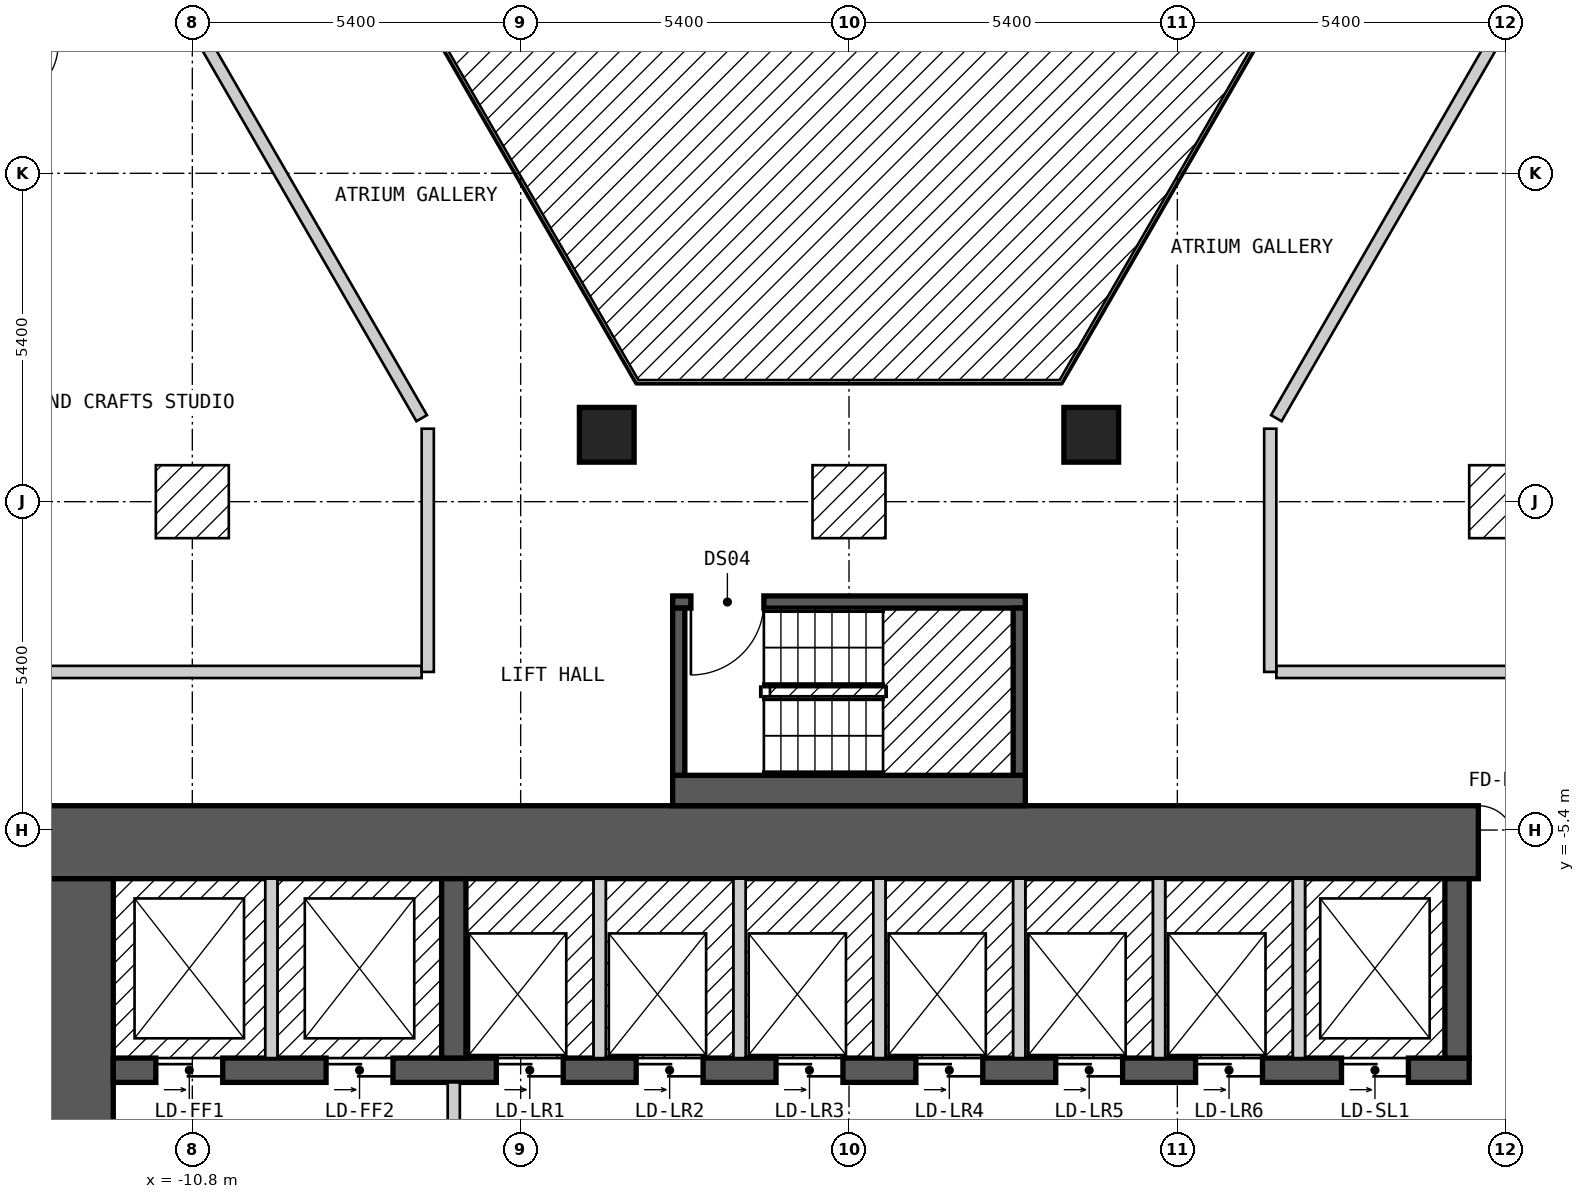
"""IFC4 building model, lengths in metres.
Left out: names, types, materials, properties, quantities, classifications, styles, units other than length and angle.
Written with IfcOpenShell. Run it as: python <this file> out.ifc"""

import sys

from ifc_helpers import new_model, si_unit, direction, frame, frame_2d, origin, origin_2d, place, context, subcontext, project, spatial, rectangle, extrude, element, fill, save


model = new_model("IFC4")
c1 = context("Model", 3, precision=1e-05, world=origin(), true_north=direction((0.0, 1.0)))
c2 = subcontext(c1, "Body", "Model", "MODEL_VIEW")
j1 = project(units=[si_unit("LENGTHUNIT", "METRE"), si_unit("PLANEANGLEUNIT", "RADIAN")], contexts=[c1])
p1 = place(None, origin())
s1 = spatial("IfcSite", under=j1, at=p1, CompositionType="ELEMENT")
p2 = place(p1, origin())
s2 = spatial("IfcBuilding", under=s1, at=p2, CompositionType="ELEMENT")
p3 = place(p2, frame((0.0, 0.0, 23.4)))
s3 = spatial("IfcBuildingStorey", under=s2, at=p3, CompositionType="ELEMENT", Elevation=23.4)
for number, where, z_axis, x_axis in (
    (1, (3.984, 1.1, 0.0), (0.0, 0.0, 1.0), (1.0, 0.0, 0.0)),
    (2, (-3.984, 1.1, 0.0), (0.0, 0.0, 1.0), (1.0, 0.0, 0.0)),
):
    element("IfcColumn", number, at=place(p3, frame(where, z_axis=z_axis, x_axis=x_axis)), inside=s3, PredefinedType="COLUMN", context=c2, shape_type="SweptSolid", body=[
        extrude(rectangle(XDim=0.9, YDim=0.9, at=origin_2d()), origin(), (0.0, 0.0, 1.0), 3.0),
    ])
p4 = place(p3, frame((-13.3, -5.6, 0.0), z_axis=(0.0, 0.0, 1.0), x_axis=(1.0, 0.0, 0.0)))
e3 = element("IfcWall", 3, at=p4, inside=s3, PredefinedType="SHEAR", context=c2, shape_type="SweptSolid", body=[
    extrude(rectangle(XDim=26.6, YDim=1.2, at=frame_2d((13.3, 0.0))), origin(), (0.0, 0.0, 1.0), 2.7),
])
p5 = place(p4, frame((23.65, 0.0, 0.0)))
e4 = element("IfcOpeningElement", 4, at=p5, cuts=e3, PredefinedType="OPENING", context=c2, shape_type="SweptSolid", body=[
    extrude(rectangle(XDim=1.2, YDim=2.1, at=frame_2d((0.6, 1.05))), frame((0.0, 0.61, 0.0), z_axis=(0.0, -1.0, 0.0), x_axis=(1.0, 0.0, 0.0)), (0.0, 0.0, 1.0), 1.22),
])
p6 = place(p3, frame((-12.7, -17.8, 0.0), z_axis=(0.0, 0.0, 1.0), x_axis=(0.0, 1.0, 0.0)))
e5 = element("IfcWall", 5, at=p6, inside=s3, PredefinedType="SHEAR", context=c2, shape_type="SweptSolid", body=[
    extrude(rectangle(XDim=11.6, YDim=1.2, at=frame_2d((5.8, 0.0))), origin(), (0.0, 0.0, 1.0), 2.7),
])
p7 = place(p6, frame((3.6, 0.0, 0.0)))
e6 = element("IfcOpeningElement", 6, at=p7, cuts=e5, PredefinedType="OPENING", context=c2, shape_type="SweptSolid", body=[
    extrude(rectangle(XDim=1.2, YDim=2.1, at=frame_2d((0.6, 1.05))), frame((0.0, 0.61, 0.0), z_axis=(0.0, -1.0, 0.0), x_axis=(1.0, 0.0, 0.0)), (0.0, 0.0, 1.0), 1.22),
])
p8 = place(p3, frame((-12.1, -9.35, 0.0), z_axis=(0.0, 0.0, 1.0), x_axis=(1.0, 0.0, 0.0)))
e7 = element("IfcWall", 7, at=p8, inside=s3, PredefinedType="SHEAR", context=c2, shape_type="SweptSolid", body=[
    extrude(rectangle(XDim=22.3, YDim=0.4, at=frame_2d((11.15, 0.0))), origin(), (0.0, 0.0, 1.0), 2.7),
])
p9 = place(p8, frame((0.7, 0.0, 0.0)))
e8 = element("IfcOpeningElement", 8, at=p9, cuts=e7, PredefinedType="OPENING", context=c2, shape_type="SweptSolid", body=[
    extrude(rectangle(XDim=1.1, YDim=2.1, at=frame_2d((0.55, 1.05))), frame((0.0, 0.21, 0.0), z_axis=(0.0, -1.0, 0.0), x_axis=(1.0, 0.0, 0.0)), (0.0, 0.0, 1.0), 0.42),
])
p10 = place(p8, frame((3.5, 0.0, 0.0)))
e9 = element("IfcOpeningElement", 9, at=p10, cuts=e7, PredefinedType="OPENING", context=c2, shape_type="SweptSolid", body=[
    extrude(rectangle(XDim=1.1, YDim=2.1, at=frame_2d((0.55, 1.05))), frame((0.0, 0.21, 0.0), z_axis=(0.0, -1.0, 0.0), x_axis=(1.0, 0.0, 0.0)), (0.0, 0.0, 1.0), 0.42),
])
p11 = place(p8, frame((6.3, 0.0, 0.0)))
e10 = element("IfcOpeningElement", 10, at=p11, cuts=e7, PredefinedType="OPENING", context=c2, shape_type="SweptSolid", body=[
    extrude(rectangle(XDim=1.1, YDim=2.1, at=frame_2d((0.55, 1.05))), frame((0.0, 0.21, 0.0), z_axis=(0.0, -1.0, 0.0), x_axis=(1.0, 0.0, 0.0)), (0.0, 0.0, 1.0), 0.42),
])
p12 = place(p8, frame((8.6, 0.0, 0.0)))
e11 = element("IfcOpeningElement", 11, at=p12, cuts=e7, PredefinedType="OPENING", context=c2, shape_type="SweptSolid", body=[
    extrude(rectangle(XDim=1.1, YDim=2.1, at=frame_2d((0.55, 1.05))), frame((0.0, 0.21, 0.0), z_axis=(0.0, -1.0, 0.0), x_axis=(1.0, 0.0, 0.0)), (0.0, 0.0, 1.0), 0.42),
])
p13 = place(p8, frame((10.9, 0.0, 0.0)))
e12 = element("IfcOpeningElement", 12, at=p13, cuts=e7, PredefinedType="OPENING", context=c2, shape_type="SweptSolid", body=[
    extrude(rectangle(XDim=1.1, YDim=2.1, at=frame_2d((0.55, 1.05))), frame((0.0, 0.21, 0.0), z_axis=(0.0, -1.0, 0.0), x_axis=(1.0, 0.0, 0.0)), (0.0, 0.0, 1.0), 0.42),
])
p14 = place(p8, frame((13.2, 0.0, 0.0)))
e13 = element("IfcOpeningElement", 13, at=p14, cuts=e7, PredefinedType="OPENING", context=c2, shape_type="SweptSolid", body=[
    extrude(rectangle(XDim=1.1, YDim=2.1, at=frame_2d((0.55, 1.05))), frame((0.0, 0.21, 0.0), z_axis=(0.0, -1.0, 0.0), x_axis=(1.0, 0.0, 0.0)), (0.0, 0.0, 1.0), 0.42),
])
p15 = place(p8, frame((15.5, 0.0, 0.0)))
e14 = element("IfcOpeningElement", 14, at=p15, cuts=e7, PredefinedType="OPENING", context=c2, shape_type="SweptSolid", body=[
    extrude(rectangle(XDim=1.1, YDim=2.1, at=frame_2d((0.55, 1.05))), frame((0.0, 0.21, 0.0), z_axis=(0.0, -1.0, 0.0), x_axis=(1.0, 0.0, 0.0)), (0.0, 0.0, 1.0), 0.42),
])
p16 = place(p8, frame((17.8, 0.0, 0.0)))
e15 = element("IfcOpeningElement", 15, at=p16, cuts=e7, PredefinedType="OPENING", context=c2, shape_type="SweptSolid", body=[
    extrude(rectangle(XDim=1.1, YDim=2.1, at=frame_2d((0.55, 1.05))), frame((0.0, 0.21, 0.0), z_axis=(0.0, -1.0, 0.0), x_axis=(1.0, 0.0, 0.0)), (0.0, 0.0, 1.0), 0.42),
])
p17 = place(p8, frame((20.2, 0.0, 0.0)))
e16 = element("IfcOpeningElement", 16, at=p17, cuts=e7, PredefinedType="OPENING", context=c2, shape_type="SweptSolid", body=[
    extrude(rectangle(XDim=1.1, YDim=2.1, at=frame_2d((0.55, 1.05))), frame((0.0, 0.21, 0.0), z_axis=(0.0, -1.0, 0.0), x_axis=(1.0, 0.0, 0.0)), (0.0, 0.0, 1.0), 0.42),
])
for number, where, z_axis, x_axis in (
    (17, (-6.5, -9.15, 0.0), (0.0, 0.0, 1.0), (0.0, 1.0, 0.0)),
    (18, (10.0, -9.15, 0.0), (0.0, 0.0, 1.0), (0.0, 1.0, 0.0)),
):
    element("IfcWall", number, at=place(p3, frame(where, z_axis=z_axis, x_axis=x_axis)), inside=s3, PredefinedType="SHEAR", context=c2, shape_type="SweptSolid", body=[
        extrude(rectangle(XDim=2.95, YDim=0.4, at=frame_2d((1.475, 0.0))), origin(), (0.0, 0.0, 1.0), 2.7),
    ])
p18 = place(p3, frame((-2.9, -4.75, 0.0), z_axis=(0.0, 0.0, 1.0), x_axis=(1.0, 0.0, 0.0)))
e19 = element("IfcWall", 19, at=p18, inside=s3, PredefinedType="SOLIDWALL", context=c2, shape_type="SweptSolid", body=[
    extrude(rectangle(XDim=5.8, YDim=0.5, at=frame_2d((2.9, 0.0))), origin(), (0.0, 0.0, 1.0), 2.7),
])
p19 = place(p3, frame((-2.9, -1.65, 0.0), z_axis=(0.0, 0.0, 1.0), x_axis=(1.0, 0.0, 0.0)))
e20 = element("IfcWall", 20, at=p19, inside=s3, PredefinedType="SOLIDWALL", context=c2, shape_type="SweptSolid", body=[
    extrude(rectangle(XDim=5.8, YDim=0.2, at=frame_2d((2.9, 0.0))), origin(), (0.0, 0.0, 1.0), 2.7),
])
p20 = place(p19, frame((0.3, 0.0, 0.0)))
e21 = element("IfcOpeningElement", 21, at=p20, cuts=e20, PredefinedType="OPENING", context=c2, shape_type="SweptSolid", body=[
    extrude(rectangle(XDim=1.2, YDim=2.1, at=frame_2d((0.6, 1.05))), frame((0.0, 0.11, 0.0), z_axis=(0.0, -1.0, 0.0), x_axis=(1.0, 0.0, 0.0)), (0.0, 0.0, 1.0), 0.22),
])
for number, where, z_axis, x_axis in (
    (22, (-2.8, -4.5, 0.0), (0.0, 0.0, 1.0), (0.0, 1.0, 0.0)),
    (23, (2.8, -4.5, 0.0), (0.0, 0.0, 1.0), (0.0, 1.0, 0.0)),
):
    element("IfcWall", number, at=place(p3, frame(where, z_axis=z_axis, x_axis=x_axis)), inside=s3, PredefinedType="SOLIDWALL", context=c2, shape_type="SweptSolid", body=[
        extrude(rectangle(XDim=2.75, YDim=0.2, at=frame_2d((1.375, 0.0))), origin(), (0.0, 0.0, 1.0), 2.7),
    ])
p21 = place(p3, frame((-10.796, 7.9, 0.0), z_axis=(0.0, 0.0, 1.0), x_axis=(0.499954271211, -0.866051803703, 0.0)))
e24 = element("IfcWall", 24, at=p21, inside=s3, PredefinedType="PARTITIONING", context=c2, shape_type="SweptSolid", body=[
    extrude(rectangle(XDim=7.536, YDim=0.2, at=frame_2d((3.768, 0.0))), origin(), (0.0, 0.0, 1.0), 2.7),
])
p22 = place(p3, frame((9.18, 15.7, 0.0), z_axis=(0.0, 0.0, 1.0), x_axis=(0.500003652032, -0.866023295272, 0.0)))
e25 = element("IfcWall", 25, at=p22, inside=s3, PredefinedType="PARTITIONING", context=c2, shape_type="SweptSolid", body=[
    extrude(rectangle(XDim=18.012, YDim=0.2, at=frame_2d((9.006, 0.0))), origin(), (0.0, 0.0, 1.0), 2.7),
])
p23 = place(p22, frame((8.556, 0.0, 0.0)))
e26 = element("IfcOpeningElement", 26, at=p23, cuts=e25, PredefinedType="OPENING", context=c2, shape_type="SweptSolid", body=[
    extrude(rectangle(XDim=0.9, YDim=2.1, at=frame_2d((0.45, 1.05))), frame((0.0, 0.11, 0.0), z_axis=(0.0, -1.0, 0.0), x_axis=(1.0, 0.0, 0.0)), (0.0, 0.0, 1.0), 0.22),
])
p24 = place(p3, frame((10.45, 17.9, 0.0), z_axis=(0.0, 0.0, 1.0), x_axis=(0.500034352617, -0.866005569383, 0.0)))
e27 = element("IfcWall", 27, at=p24, inside=s3, PredefinedType="PARTITIONING", context=c2, shape_type="SweptSolid", body=[
    extrude(rectangle(XDim=20.553, YDim=0.2, at=frame_2d((10.276, 0.0))), origin(), (0.0, 0.0, 1.0), 2.7),
])
p25 = place(p24, frame((14.903, 0.0, 0.0)))
e28 = element("IfcOpeningElement", 28, at=p25, cuts=e27, PredefinedType="OPENING", context=c2, shape_type="SweptSolid", body=[
    extrude(rectangle(XDim=1.0, YDim=2.1, at=frame_2d((0.5, 1.05))), frame((0.0, 0.11, 0.0), z_axis=(0.0, -1.0, 0.0), x_axis=(1.0, 0.0, 0.0)), (0.0, 0.0, 1.0), 0.22),
])
p26 = place(p24, frame((9.775, 0.0, 0.0)))
e29 = element("IfcOpeningElement", 29, at=p26, cuts=e27, PredefinedType="OPENING", context=c2, shape_type="SweptSolid", body=[
    extrude(rectangle(XDim=1.0, YDim=2.1, at=frame_2d((0.5, 1.05))), frame((0.0, 0.11, 0.0), z_axis=(0.0, -1.0, 0.0), x_axis=(1.0, 0.0, 0.0)), (0.0, 0.0, 1.0), 0.22),
])
for number, where, z_axis, x_axis in (
    (30, (-15.4, -2.8, 0.0), (0.0, 0.0, 1.0), (1.0, 0.0, 0.0)),
    (31, (7.028, -2.8, 0.0), (0.0, 0.0, 1.0), (1.0, 0.0, 0.0)),
):
    element("IfcWall", number, at=place(p3, frame(where, z_axis=z_axis, x_axis=x_axis)), inside=s3, PredefinedType="PARTITIONING", context=c2, shape_type="SweptSolid", body=[
        extrude(rectangle(XDim=8.372, YDim=0.2, at=frame_2d((4.186, 0.0))), origin(), (0.0, 0.0, 1.0), 2.7),
    ])
p27 = place(p3, frame((7.028, 1.373, 0.0), z_axis=(0.0, 0.0, 1.0), x_axis=(0.49998574534, 0.86603363356, 0.0)))
e32 = element("IfcWall", 32, at=p27, inside=s3, PredefinedType="PARTITIONING", context=c2, shape_type="SweptSolid", body=[
    extrude(rectangle(XDim=7.652, YDim=0.2, at=frame_2d((3.826, 0.0))), origin(), (0.0, 0.0, 1.0), 2.7),
])
p28 = place(p3, frame((-18.244, -0.001, 0.0), z_axis=(0.0, 0.0, 1.0), x_axis=(0.499962999376, 0.866046765051, 0.0)))
e33 = element("IfcWall", 33, at=p28, inside=s3, PredefinedType="PARTITIONING", context=c2, shape_type="SweptSolid", body=[
    extrude(rectangle(XDim=18.245, YDim=0.2, at=frame_2d((9.123, 0.0))), origin(), (0.0, 0.0, 1.0), 2.7),
])
p29 = place(p28, frame((8.672, 0.0, 0.0)))
e34 = element("IfcOpeningElement", 34, at=p29, cuts=e33, PredefinedType="OPENING", context=c2, shape_type="SweptSolid", body=[
    extrude(rectangle(XDim=0.9, YDim=2.1, at=frame_2d((0.45, 1.05))), frame((0.0, 0.11, 0.0), z_axis=(0.0, -1.0, 0.0), x_axis=(1.0, 0.0, 0.0)), (0.0, 0.0, 1.0), 0.22),
])
p30 = place(p3, frame((-20.727, 0.099, 0.0), z_axis=(0.0, 0.0, 1.0), x_axis=(0.499993204491, 0.866029327138, 0.0)))
e35 = element("IfcWall", 35, at=p30, inside=s3, PredefinedType="PARTITIONING", context=c2, shape_type="SweptSolid", body=[
    extrude(rectangle(XDim=20.554, YDim=0.2, at=frame_2d((10.277, 0.0))), origin(), (0.0, 0.0, 1.0), 2.7),
])
p31 = place(p30, frame((14.88, 0.0, 0.0)))
e36 = element("IfcOpeningElement", 36, at=p31, cuts=e35, PredefinedType="OPENING", context=c2, shape_type="SweptSolid", body=[
    extrude(rectangle(XDim=1.0, YDim=2.1, at=frame_2d((0.5, 1.05))), frame((0.0, 0.11, 0.0), z_axis=(0.0, -1.0, 0.0), x_axis=(1.0, 0.0, 0.0)), (0.0, 0.0, 1.0), 0.22),
])
p32 = place(p30, frame((4.673, 0.0, 0.0)))
e37 = element("IfcOpeningElement", 37, at=p32, cuts=e35, PredefinedType="OPENING", context=c2, shape_type="SweptSolid", body=[
    extrude(rectangle(XDim=1.0, YDim=2.1, at=frame_2d((0.5, 1.05))), frame((0.0, 0.11, 0.0), z_axis=(0.0, -1.0, 0.0), x_axis=(1.0, 0.0, 0.0)), (0.0, 0.0, 1.0), 0.22),
])
for number, where, z_axis, x_axis in (
    (38, (6.928, -2.8, 0.0), (0.0, 0.0, 1.0), (0.0, 1.0, 0.0)),
    (39, (-6.928, -2.8, 0.0), (0.0, 0.0, 1.0), (0.0, 1.0, 0.0)),
):
    element("IfcWall", number, at=place(p3, frame(where, z_axis=z_axis, x_axis=x_axis)), inside=s3, PredefinedType="PARTITIONING", context=c2, shape_type="SweptSolid", body=[
        extrude(rectangle(XDim=4.0, YDim=0.2, at=frame_2d((2.0, 0.0))), origin(), (0.0, 0.0, 1.0), 2.7),
    ])
p33 = place(p3, frame((-9.5, -9.15, 0.0), z_axis=(0.0, 0.0, 1.0), x_axis=(0.0, 1.0, 0.0)))
e40 = element("IfcWall", 40, at=p33, inside=s3, PredefinedType="SOLIDWALL", context=c2, shape_type="SweptSolid", body=[
    extrude(rectangle(XDim=2.95, YDim=0.2, at=frame_2d((1.475, 0.0))), origin(), (0.0, 0.0, 1.0), 2.7),
])
p34 = place(p3, frame((-6.5, -14.45, 0.0), z_axis=(0.0, 0.0, 1.0), x_axis=(0.0, 1.0, 0.0)))
e41 = element("IfcWall", 41, at=p34, inside=s3, PredefinedType="PARTITIONING", context=c2, shape_type="SweptSolid", body=[
    extrude(rectangle(XDim=4.9, YDim=0.2, at=frame_2d((2.45, 0.0))), origin(), (0.0, 0.0, 1.0), 2.7),
])
p35 = place(p34, frame((3.15, 0.0, 0.0), z_axis=(0.0, 0.0, 1.0), x_axis=(-1.0, 0.0, 0.0)))
e42 = element("IfcOpeningElement", 42, at=p35, cuts=e41, PredefinedType="OPENING", context=c2, shape_type="SweptSolid", body=[
    extrude(rectangle(XDim=1.4, YDim=2.1, at=frame_2d((0.7, 1.05))), frame((0.0, 0.11, 0.0), z_axis=(0.0, -1.0, 0.0), x_axis=(1.0, 0.0, 0.0)), (0.0, 0.0, 1.0), 0.22),
])
for number, where, z_axis, x_axis in (
    (43, (-4.1, -9.15, 0.0), (0.0, 0.0, 1.0), (0.0, 1.0, 0.0)),
    (44, (-1.8, -9.15, 0.0), (0.0, 0.0, 1.0), (0.0, 1.0, 0.0)),
    (45, (0.5, -9.15, 0.0), (0.0, 0.0, 1.0), (0.0, 1.0, 0.0)),
    (46, (2.8, -9.15, 0.0), (0.0, 0.0, 1.0), (0.0, 1.0, 0.0)),
    (47, (5.1, -9.15, 0.0), (0.0, 0.0, 1.0), (0.0, 1.0, 0.0)),
    (48, (7.4, -9.15, 0.0), (0.0, 0.0, 1.0), (0.0, 1.0, 0.0)),
):
    element("IfcWall", number, at=place(p3, frame(where, z_axis=z_axis, x_axis=x_axis)), inside=s3, PredefinedType="SOLIDWALL", context=c2, shape_type="SweptSolid", body=[
        extrude(rectangle(XDim=2.95, YDim=0.2, at=frame_2d((1.475, 0.0))), origin(), (0.0, 0.0, 1.0), 2.7),
    ])
p36 = place(p20, origin())
e49 = element("IfcDoor", 49, at=p36, inside=s3, OperationType="SINGLE_SWING_LEFT", PredefinedType="DOOR", context=c2, shape_type="SweptSolid", body=[
    extrude(rectangle(XDim=1.2, YDim=2.1, at=frame_2d((0.6, 1.05))), frame((0.0, 0.025, 0.0), z_axis=(0.0, -1.0, 0.0), x_axis=(1.0, 0.0, 0.0)), (0.0, 0.0, 1.0), 0.05),
])
fill(e21, e49)
p37 = place(p9, origin())
e50 = element("IfcDoor", 50, at=p37, inside=s3, OperationType="DOUBLE_DOOR_SLIDING", PredefinedType="DOOR", context=c2, shape_type="SweptSolid", body=[
    extrude(rectangle(XDim=1.1, YDim=2.1, at=frame_2d((0.55, 1.05))), frame((0.0, 0.025, 0.0), z_axis=(0.0, -1.0, 0.0), x_axis=(1.0, 0.0, 0.0)), (0.0, 0.0, 1.0), 0.05),
])
fill(e8, e50)
p38 = place(p10, origin())
e51 = element("IfcDoor", 51, at=p38, inside=s3, OperationType="DOUBLE_DOOR_SLIDING", PredefinedType="DOOR", context=c2, shape_type="SweptSolid", body=[
    extrude(rectangle(XDim=1.1, YDim=2.1, at=frame_2d((0.55, 1.05))), frame((0.0, 0.025, 0.0), z_axis=(0.0, -1.0, 0.0), x_axis=(1.0, 0.0, 0.0)), (0.0, 0.0, 1.0), 0.05),
])
fill(e9, e51)
p39 = place(p11, origin())
e52 = element("IfcDoor", 52, at=p39, inside=s3, OperationType="DOUBLE_DOOR_SLIDING", PredefinedType="DOOR", context=c2, shape_type="SweptSolid", body=[
    extrude(rectangle(XDim=1.1, YDim=2.1, at=frame_2d((0.55, 1.05))), frame((0.0, 0.025, 0.0), z_axis=(0.0, -1.0, 0.0), x_axis=(1.0, 0.0, 0.0)), (0.0, 0.0, 1.0), 0.05),
])
fill(e10, e52)
p40 = place(p12, origin())
e53 = element("IfcDoor", 53, at=p40, inside=s3, OperationType="DOUBLE_DOOR_SLIDING", PredefinedType="DOOR", context=c2, shape_type="SweptSolid", body=[
    extrude(rectangle(XDim=1.1, YDim=2.1, at=frame_2d((0.55, 1.05))), frame((0.0, 0.025, 0.0), z_axis=(0.0, -1.0, 0.0), x_axis=(1.0, 0.0, 0.0)), (0.0, 0.0, 1.0), 0.05),
])
fill(e11, e53)
p41 = place(p13, origin())
e54 = element("IfcDoor", 54, at=p41, inside=s3, OperationType="DOUBLE_DOOR_SLIDING", PredefinedType="DOOR", context=c2, shape_type="SweptSolid", body=[
    extrude(rectangle(XDim=1.1, YDim=2.1, at=frame_2d((0.55, 1.05))), frame((0.0, 0.025, 0.0), z_axis=(0.0, -1.0, 0.0), x_axis=(1.0, 0.0, 0.0)), (0.0, 0.0, 1.0), 0.05),
])
fill(e12, e54)
p42 = place(p14, origin())
e55 = element("IfcDoor", 55, at=p42, inside=s3, OperationType="DOUBLE_DOOR_SLIDING", PredefinedType="DOOR", context=c2, shape_type="SweptSolid", body=[
    extrude(rectangle(XDim=1.1, YDim=2.1, at=frame_2d((0.55, 1.05))), frame((0.0, 0.025, 0.0), z_axis=(0.0, -1.0, 0.0), x_axis=(1.0, 0.0, 0.0)), (0.0, 0.0, 1.0), 0.05),
])
fill(e13, e55)
p43 = place(p15, origin())
e56 = element("IfcDoor", 56, at=p43, inside=s3, OperationType="DOUBLE_DOOR_SLIDING", PredefinedType="DOOR", context=c2, shape_type="SweptSolid", body=[
    extrude(rectangle(XDim=1.1, YDim=2.1, at=frame_2d((0.55, 1.05))), frame((0.0, 0.025, 0.0), z_axis=(0.0, -1.0, 0.0), x_axis=(1.0, 0.0, 0.0)), (0.0, 0.0, 1.0), 0.05),
])
fill(e14, e56)
p44 = place(p16, origin())
e57 = element("IfcDoor", 57, at=p44, inside=s3, OperationType="DOUBLE_DOOR_SLIDING", PredefinedType="DOOR", context=c2, shape_type="SweptSolid", body=[
    extrude(rectangle(XDim=1.1, YDim=2.1, at=frame_2d((0.55, 1.05))), frame((0.0, 0.025, 0.0), z_axis=(0.0, -1.0, 0.0), x_axis=(1.0, 0.0, 0.0)), (0.0, 0.0, 1.0), 0.05),
])
fill(e15, e57)
p45 = place(p17, origin())
e58 = element("IfcDoor", 58, at=p45, inside=s3, OperationType="DOUBLE_DOOR_SLIDING", PredefinedType="DOOR", context=c2, shape_type="SweptSolid", body=[
    extrude(rectangle(XDim=1.1, YDim=2.1, at=frame_2d((0.55, 1.05))), frame((0.0, 0.025, 0.0), z_axis=(0.0, -1.0, 0.0), x_axis=(1.0, 0.0, 0.0)), (0.0, 0.0, 1.0), 0.05),
])
fill(e16, e58)
p46 = place(p5, origin())
e59 = element("IfcDoor", 59, at=p46, inside=s3, OperationType="DOUBLE_DOOR_SINGLE_SWING", PredefinedType="DOOR", context=c2, shape_type="SweptSolid", body=[
    extrude(rectangle(XDim=1.2, YDim=2.1, at=frame_2d((0.6, 1.05))), frame((0.0, 0.025, 0.0), z_axis=(0.0, -1.0, 0.0), x_axis=(1.0, 0.0, 0.0)), (0.0, 0.0, 1.0), 0.05),
])
fill(e4, e59)
save(model, sys.argv[1])
